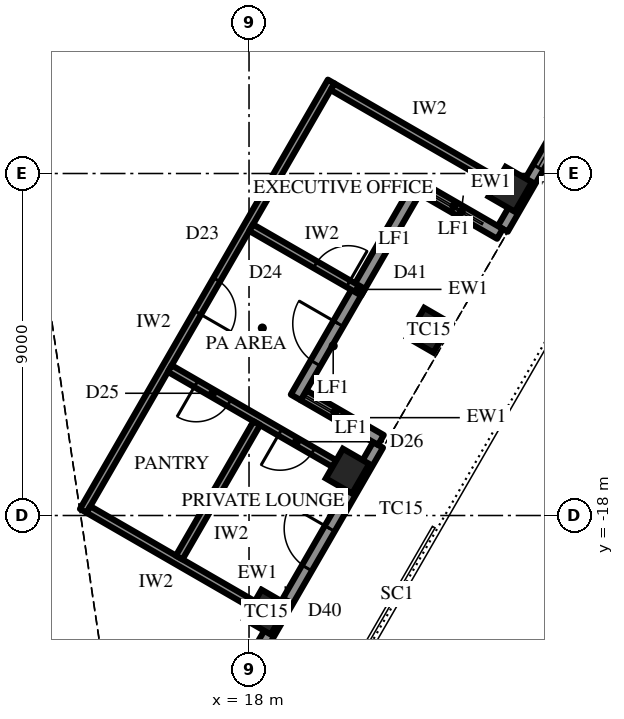
"""IFC4 building model, lengths in metres.
Left out: names, types, materials, properties, quantities, classifications, styles, units other than length and angle.
Written with IfcOpenShell. Run it as: python <this file> out.ifc"""

import sys

from ifc_helpers import new_model, si_unit, direction, frame, frame_2d, origin, origin_2d, place, context, subcontext, project, spatial, rectangle, extrude, element, fill, save


model = new_model("IFC4")
c1 = context("Model", 3, precision=1e-05, world=origin(), true_north=direction((0.0, 1.0)))
c2 = subcontext(c1, "Body", "Model", "MODEL_VIEW")
j1 = project(units=[si_unit("LENGTHUNIT", "METRE"), si_unit("PLANEANGLEUNIT", "RADIAN")], contexts=[c1])
p1 = place(None, origin())
s1 = spatial("IfcSite", under=j1, at=p1, CompositionType="ELEMENT")
p2 = place(p1, origin())
s2 = spatial("IfcBuilding", under=s1, at=p2, CompositionType="ELEMENT")
p3 = place(p2, frame((0.0, 0.0, 353.5)))
s3 = spatial("IfcBuildingStorey", under=s2, at=p3, CompositionType="ELEMENT", Elevation=353.5)
for number, where, z_axis, x_axis in (
    (1, (18.451, -20.542, 0.0), (0.0, 0.0, 1.0), (0.5, 0.866, 0.0)),
    (2, (20.592, -16.833, 0.0), (0.0, 0.0, 1.0), (0.5, 0.866, 0.0)),
    (3, (22.733, -13.125, 0.0), (0.0, 0.0, 1.0), (0.5, 0.866, 0.0)),
    (4, (24.874, -9.417, 0.0), (0.0, 0.0, 1.0), (0.5, 0.866, 0.0)),
):
    element("IfcColumn", number, at=place(p3, frame(where, z_axis=z_axis, x_axis=x_axis)), inside=s3, PredefinedType="COLUMN", context=c2, shape_type="SweptSolid", body=[
        extrude(rectangle(XDim=0.9, YDim=0.8, at=origin_2d()), origin(), (0.0, 0.0, 1.0), 4.2),
    ])
p4 = place(p3, frame((16.613, -24.425, 0.0), z_axis=(0.0, 0.0, 1.0), x_axis=(0.499996453679, 0.866027451244, 0.0)))
e5 = element("IfcWall", 5, at=p4, inside=s3, PredefinedType="SOLIDWALL", context=c2, shape_type="SweptSolid", body=[
    extrude(rectangle(XDim=9.564, YDim=0.3, at=frame_2d((4.782, 0.0))), origin(), (0.0, 0.0, 1.0), 2.9),
])
p5 = place(p4, frame((0.866, 0.0, 0.6)))
e6 = element("IfcOpeningElement", 6, at=p5, cuts=e5, PredefinedType="OPENING", context=c2, shape_type="SweptSolid", body=[
    extrude(rectangle(XDim=2.55, YDim=2.05, at=frame_2d((1.275, 1.025))), frame((0.0, 0.16, 0.0), z_axis=(0.0, -1.0, 0.0), x_axis=(1.0, 0.0, 0.0)), (0.0, 0.0, 1.0), 0.32),
])
p6 = place(p4, frame((5.823, 0.0, 0.0)))
e7 = element("IfcOpeningElement", 7, at=p6, cuts=e5, PredefinedType="OPENING", context=c2, shape_type="SweptSolid", body=[
    extrude(rectangle(XDim=1.2, YDim=2.4, at=frame_2d((0.6, 1.2))), frame((0.0, 0.16, 0.0), z_axis=(0.0, -1.0, 0.0), x_axis=(1.0, 0.0, 0.0)), (0.0, 0.0, 1.0), 0.32),
])
p7 = place(p3, frame((24.677, -10.458, 0.0), z_axis=(0.0, 0.0, 1.0), x_axis=(0.499996453679, 0.866027451244, 0.0)))
e8 = element("IfcWall", 8, at=p7, inside=s3, PredefinedType="SOLIDWALL", context=c2, shape_type="SweptSolid", body=[
    extrude(rectangle(XDim=9.564, YDim=0.3, at=frame_2d((4.782, 0.0))), origin(), (0.0, 0.0, 1.0), 2.9),
])
p8 = place(p7, frame((1.866, 0.0, 0.6)))
e9 = element("IfcOpeningElement", 9, at=p8, cuts=e8, PredefinedType="OPENING", context=c2, shape_type="SweptSolid", body=[
    extrude(rectangle(XDim=2.55, YDim=2.05, at=frame_2d((1.275, 1.025))), frame((0.0, 0.16, 0.0), z_axis=(0.0, -1.0, 0.0), x_axis=(1.0, 0.0, 0.0)), (0.0, 0.0, 1.0), 0.32),
])
p9 = place(p7, frame((6.148, 0.0, 0.6)))
e10 = element("IfcOpeningElement", 10, at=p9, cuts=e8, PredefinedType="OPENING", context=c2, shape_type="SweptSolid", body=[
    extrude(rectangle(XDim=2.55, YDim=2.05, at=frame_2d((1.275, 1.025))), frame((0.0, 0.16, 0.0), z_axis=(0.0, -1.0, 0.0), x_axis=(1.0, 0.0, 0.0)), (0.0, 0.0, 1.0), 0.32),
])
for number, where, z_axis, x_axis in (
    (11, (21.47, -16.012, 0.0), (0.0, 0.0, 1.0), (-0.866, 0.5, 0.0)),
    (12, (24.602, -10.588, 0.0), (0.0, 0.0, 1.0), (-0.866, 0.5, 0.0)),
):
    element("IfcWall", number, at=place(p3, frame(where, z_axis=z_axis, x_axis=x_axis)), inside=s3, PredefinedType="SOLIDWALL", context=c2, shape_type="SweptSolid", body=[
        extrude(rectangle(XDim=2.35, YDim=0.3, at=frame_2d((1.175, 0.0))), origin(), (0.0, 0.0, 1.0), 2.9),
    ])
p10 = place(p3, frame((19.23, -14.892, 0.0), z_axis=(0.0, 0.0, 1.0), x_axis=(0.499999339774, 0.866025784966, 0.0)))
e13 = element("IfcWall", 13, at=p10, inside=s3, PredefinedType="SOLIDWALL", context=c2, shape_type="SweptSolid", body=[
    extrude(rectangle(XDim=6.564, YDim=0.3, at=frame_2d((3.282, 0.0))), origin(), (0.0, 0.0, 1.0), 2.9),
])
p11 = place(p10, frame((1.041, 0.0, 0.0)))
e14 = element("IfcOpeningElement", 14, at=p11, cuts=e13, PredefinedType="OPENING", context=c2, shape_type="SweptSolid", body=[
    extrude(rectangle(XDim=1.2, YDim=2.4, at=frame_2d((0.6, 1.2))), frame((0.0, 0.16, 0.0), z_axis=(0.0, -1.0, 0.0), x_axis=(1.0, 0.0, 0.0)), (0.0, 0.0, 1.0), 0.32),
])
p12 = place(p3, frame((13.638, -17.878, 0.0), z_axis=(0.0, 0.0, 1.0), x_axis=(0.500013496215, 0.866017611601, 0.0)))
e15 = element("IfcWall", 15, at=p12, inside=s3, PredefinedType="PARTITIONING", context=c2, shape_type="SweptSolid", body=[
    extrude(rectangle(XDim=13.046, YDim=0.2, at=frame_2d((6.523, 0.0))), origin(), (0.0, 0.0, 1.0), 4.0),
])
p13 = place(p12, frame((6.023, 0.0, 0.0)))
e16 = element("IfcOpeningElement", 16, at=p13, cuts=e15, PredefinedType="OPENING", context=c2, shape_type="SweptSolid", body=[
    extrude(rectangle(XDim=1.0, YDim=2.2, at=frame_2d((0.5, 1.1))), frame((0.0, 0.11, 0.0), z_axis=(0.0, -1.0, 0.0), x_axis=(1.0, 0.0, 0.0)), (0.0, 0.0, 1.0), 0.22),
])
p14 = place(p3, frame((13.775, -17.842, 0.0), z_axis=(0.0, 0.0, 1.0), x_axis=(0.866022959057, -0.500004234368, 0.0)))
e17 = element("IfcWall", 17, at=p14, inside=s3, PredefinedType="PARTITIONING", context=c2, shape_type="SweptSolid", body=[
    extrude(rectangle(XDim=5.0, YDim=0.2, at=frame_2d((2.5, 0.0))), origin(), (0.0, 0.0, 1.0), 3.082),
])
p15 = place(p3, frame((15.916, -14.133, 0.0), z_axis=(0.0, 0.0, 1.0), x_axis=(0.866035165624, -0.499983091616, 0.0)))
e18 = element("IfcWall", 18, at=p15, inside=s3, PredefinedType="PARTITIONING", context=c2, shape_type="SweptSolid", body=[
    extrude(rectangle(XDim=5.0, YDim=0.2, at=frame_2d((2.5, 0.0))), origin(), (0.0, 0.0, 1.0), 3.082),
])
p16 = place(p15, frame((0.8, 0.0, 0.0)))
e19 = element("IfcOpeningElement", 19, at=p16, cuts=e18, PredefinedType="OPENING", context=c2, shape_type="SweptSolid", body=[
    extrude(rectangle(XDim=1.0, YDim=2.2, at=frame_2d((0.5, 1.1))), frame((0.0, 0.11, 0.0), z_axis=(0.0, -1.0, 0.0), x_axis=(1.0, 0.0, 0.0)), (0.0, 0.0, 1.0), 0.22),
])
p17 = place(p15, frame((3.35, 0.0, 0.0)))
e20 = element("IfcOpeningElement", 20, at=p17, cuts=e18, PredefinedType="OPENING", context=c2, shape_type="SweptSolid", body=[
    extrude(rectangle(XDim=1.0, YDim=2.2, at=frame_2d((0.5, 1.1))), frame((0.0, 0.11, 0.0), z_axis=(0.0, -1.0, 0.0), x_axis=(1.0, 0.0, 0.0)), (0.0, 0.0, 1.0), 0.22),
])
p18 = place(p3, frame((18.057, -10.425, 0.0), z_axis=(0.0, 0.0, 1.0), x_axis=(0.866030179784, -0.499991727635, 0.0)))
e21 = element("IfcWall", 21, at=p18, inside=s3, PredefinedType="PARTITIONING", context=c2, shape_type="SweptSolid", body=[
    extrude(rectangle(XDim=3.401, YDim=0.2, at=frame_2d((1.7, 0.0))), origin(), (0.0, 0.0, 1.0), 3.082),
])
p19 = place(p18, frame((1.95, 0.0, 0.0)))
e22 = element("IfcOpeningElement", 22, at=p19, cuts=e21, PredefinedType="OPENING", context=c2, shape_type="SweptSolid", body=[
    extrude(rectangle(XDim=1.0, YDim=2.2, at=frame_2d((0.5, 1.1))), frame((0.0, 0.11, 0.0), z_axis=(0.0, -1.0, 0.0), x_axis=(1.0, 0.0, 0.0)), (0.0, 0.0, 1.0), 0.22),
])
p20 = place(p3, frame((20.198, -6.717, 0.0), z_axis=(0.0, 0.0, 1.0), x_axis=(0.866022959057, -0.500004234368, 0.0)))
e23 = element("IfcWall", 23, at=p20, inside=s3, PredefinedType="PARTITIONING", context=c2, shape_type="SweptSolid", body=[
    extrude(rectangle(XDim=5.0, YDim=0.2, at=frame_2d((2.5, 0.0))), origin(), (0.0, 0.0, 1.0), 2.992),
])
p21 = place(p3, frame((16.163, -19.105, 0.0), z_axis=(0.0, 0.0, 1.0), x_axis=(0.499998569178, 0.866026229868, 0.0)))
e24 = element("IfcWall", 24, at=p21, inside=s3, PredefinedType="PARTITIONING", context=c2, shape_type="SweptSolid", body=[
    extrude(rectangle(XDim=4.082, YDim=0.2, at=frame_2d((2.041, 0.0))), origin(), (0.0, 0.0, 1.0), 4.0),
])
p22 = place(p6, origin())
e25 = element("IfcDoor", 25, at=p22, inside=s3, OperationType="SINGLE_SWING_LEFT", PredefinedType="DOOR", context=c2, shape_type="SweptSolid", body=[
    extrude(rectangle(XDim=1.2, YDim=2.4, at=frame_2d((0.6, 1.2))), frame((0.0, 0.025, 0.0), z_axis=(0.0, -1.0, 0.0), x_axis=(1.0, 0.0, 0.0)), (0.0, 0.0, 1.0), 0.05),
])
fill(e7, e25)
p23 = place(p8, origin())
e26 = element("IfcWindow", 26, at=p23, inside=s3, PartitioningType="SINGLE_PANEL", PredefinedType="WINDOW", context=c2, shape_type="SweptSolid", body=[
    extrude(rectangle(XDim=2.55, YDim=2.05, at=frame_2d((1.275, 1.025))), frame((0.0, 0.03, 0.0), z_axis=(0.0, -1.0, 0.0), x_axis=(1.0, 0.0, 0.0)), (0.0, 0.0, 1.0), 0.06),
])
fill(e9, e26)
p24 = place(p11, origin())
e27 = element("IfcDoor", 27, at=p24, inside=s3, OperationType="SINGLE_SWING_LEFT", PredefinedType="DOOR", context=c2, shape_type="SweptSolid", body=[
    extrude(rectangle(XDim=1.2, YDim=2.4, at=frame_2d((0.6, 1.2))), frame((0.0, 0.025, 0.0), z_axis=(0.0, -1.0, 0.0), x_axis=(1.0, 0.0, 0.0)), (0.0, 0.0, 1.0), 0.05),
])
fill(e14, e27)
p25 = place(p16, frame((1.0, 0.0, 0.0), z_axis=(0.0, 0.0, 1.0), x_axis=(-1.0, 0.0, 0.0)))
e28 = element("IfcDoor", 28, at=p25, inside=s3, OperationType="SINGLE_SWING_LEFT", PredefinedType="DOOR", context=c2, shape_type="SweptSolid", body=[
    extrude(rectangle(XDim=1.0, YDim=2.2, at=frame_2d((0.5, 1.1))), frame((0.0, 0.025, 0.0), z_axis=(0.0, -1.0, 0.0), x_axis=(1.0, 0.0, 0.0)), (0.0, 0.0, 1.0), 0.05),
])
fill(e19, e28)
p26 = place(p17, frame((1.0, 0.0, 0.0), z_axis=(0.0, 0.0, 1.0), x_axis=(-1.0, 0.0, 0.0)))
e29 = element("IfcDoor", 29, at=p26, inside=s3, OperationType="SINGLE_SWING_LEFT", PredefinedType="DOOR", context=c2, shape_type="SweptSolid", body=[
    extrude(rectangle(XDim=1.0, YDim=2.2, at=frame_2d((0.5, 1.1))), frame((0.0, 0.025, 0.0), z_axis=(0.0, -1.0, 0.0), x_axis=(1.0, 0.0, 0.0)), (0.0, 0.0, 1.0), 0.05),
])
fill(e20, e29)
p27 = place(p13, frame((1.0, 0.0, 0.0), z_axis=(0.0, 0.0, 1.0), x_axis=(-1.0, 0.0, 0.0)))
e30 = element("IfcDoor", 30, at=p27, inside=s3, OperationType="SINGLE_SWING_LEFT", PredefinedType="DOOR", context=c2, shape_type="SweptSolid", body=[
    extrude(rectangle(XDim=1.0, YDim=2.2, at=frame_2d((0.5, 1.1))), frame((0.0, 0.025, 0.0), z_axis=(0.0, -1.0, 0.0), x_axis=(1.0, 0.0, 0.0)), (0.0, 0.0, 1.0), 0.05),
])
fill(e16, e30)
p28 = place(p19, origin())
e31 = element("IfcDoor", 31, at=p28, inside=s3, OperationType="SINGLE_SWING_LEFT", PredefinedType="DOOR", context=c2, shape_type="SweptSolid", body=[
    extrude(rectangle(XDim=1.0, YDim=2.2, at=frame_2d((0.5, 1.1))), frame((0.0, 0.025, 0.0), z_axis=(0.0, -1.0, 0.0), x_axis=(1.0, 0.0, 0.0)), (0.0, 0.0, 1.0), 0.05),
])
fill(e22, e31)
save(model, sys.argv[1])
